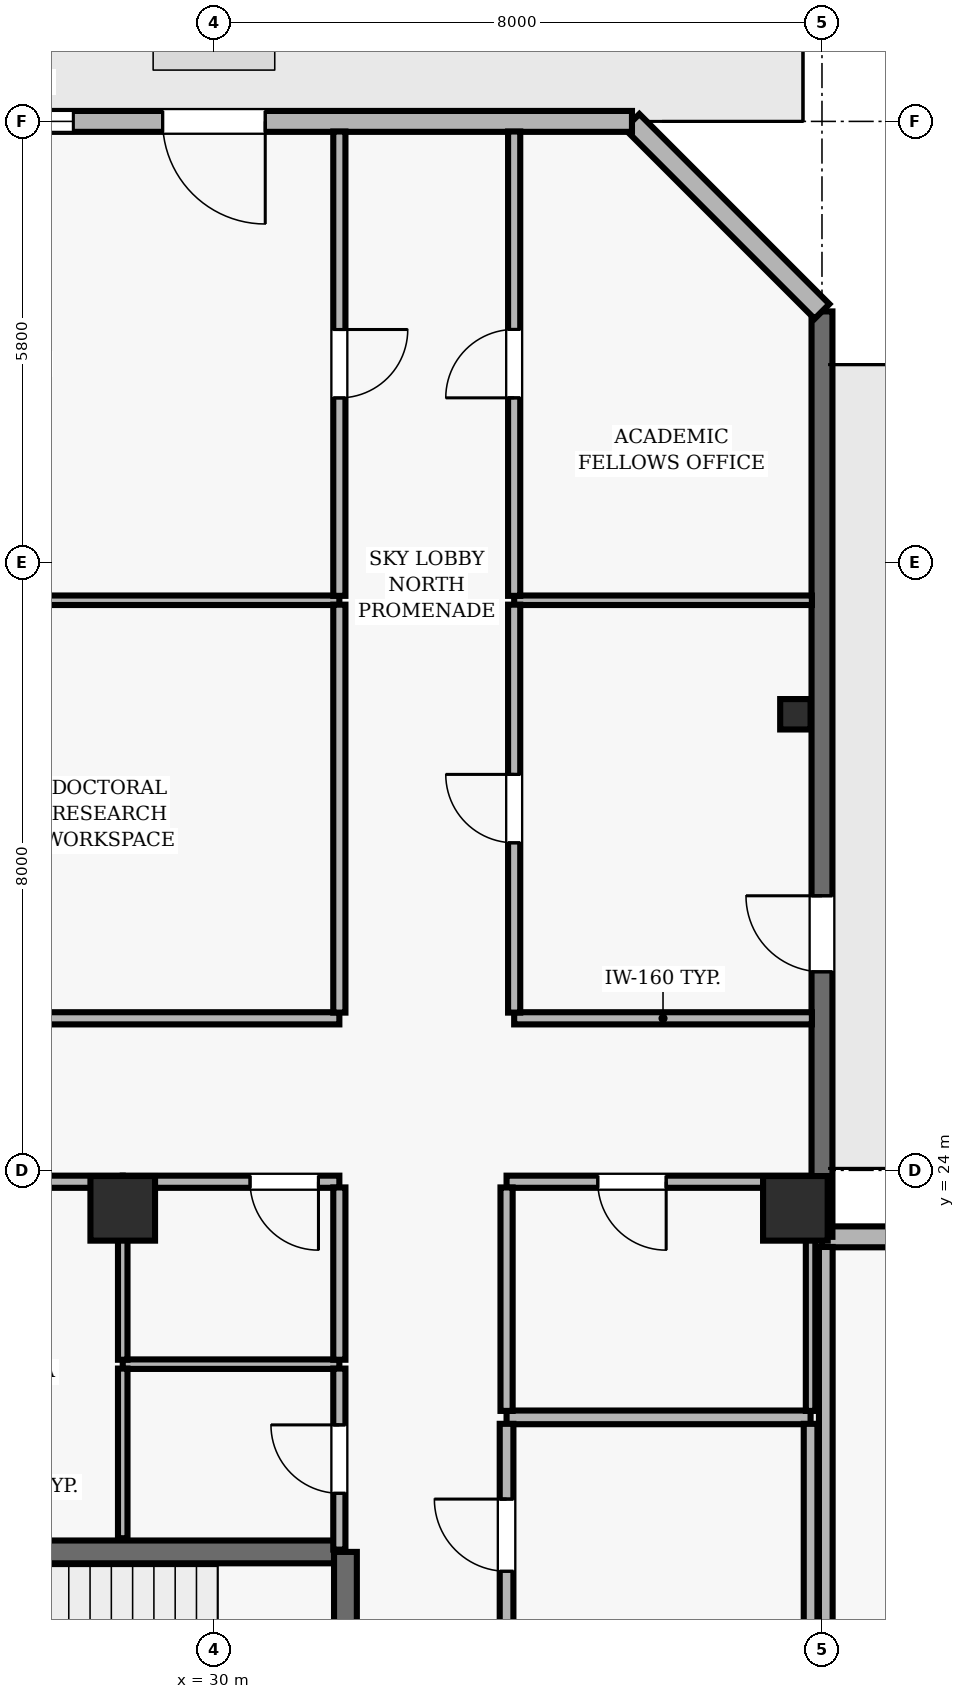
"""IFC4 building model, lengths in metres.
Left out: names, types, materials, properties, quantities, classifications, styles, units other than length and angle.
Written with IfcOpenShell. Run it as: python <this file> out.ifc"""

import sys

from ifc_helpers import new_model, si_unit, direction, frame, frame_2d, origin, origin_2d, place, context, subcontext, project, spatial, rectangle, hollow_rectangle, extrude, element, fill, save


model = new_model("IFC4")
c1 = context("Model", 3, precision=1e-05, world=origin(), true_north=direction((0.0, 1.0)))
c2 = subcontext(c1, "Body", "Model", "MODEL_VIEW")
j1 = project(units=[si_unit("LENGTHUNIT", "METRE"), si_unit("PLANEANGLEUNIT", "RADIAN")], contexts=[c1])
p1 = place(None, origin())
s1 = spatial("IfcSite", under=j1, at=p1, CompositionType="ELEMENT")
p2 = place(p1, origin())
s2 = spatial("IfcBuilding", under=s1, at=p2, CompositionType="ELEMENT")
p3 = place(p2, frame((0.0, 0.0, 243.2)))
s3 = spatial("IfcBuildingStorey", under=s2, at=p3, CompositionType="ELEMENT", Elevation=243.2)
for number, where, z_axis, x_axis in (
    (1, (28.8, 23.5, 0.0), (0.0, 0.0, 1.0), (1.0, 0.0, 0.0)),
    (2, (37.65, 23.5, 0.0), (0.0, 0.0, 1.0), (1.0, 0.0, 0.0)),
):
    element("IfcColumn", number, at=place(p3, frame(where, z_axis=z_axis, x_axis=x_axis)), inside=s3, PredefinedType="COLUMN", context=c2, shape_type="SweptSolid", body=[
        extrude(rectangle(XDim=0.85, YDim=0.85, at=origin_2d()), origin(), (0.0, 0.0, 1.0), 5.0),
    ])
p4 = place(p3, frame((37.65, 30.0, 0.0), z_axis=(0.0, 0.0, 1.0), x_axis=(1.0, 0.0, 0.0)))
e3 = element("IfcColumn", 3, at=p4, inside=s3, PredefinedType="COLUMN", context=c2, shape_type="SweptSolid", body=[
    extrude(hollow_rectangle(XDim=0.4, YDim=0.4, WallThickness=0.02, at=origin_2d()), origin(), (0.0, 0.0, 1.0), 5.0),
])
p5 = place(p3, frame((46.3, 23.125, 0.0), z_axis=(0.0, 0.0, 1.0), x_axis=(-1.0, 0.0, 0.0)))
e4 = element("IfcWall", 4, at=p5, inside=s3, PredefinedType="SOLIDWALL", context=c2, shape_type="SweptSolid", body=[
    extrude(rectangle(XDim=8.3, YDim=0.275, at=frame_2d((4.15, 0.0))), origin(), (0.0, 0.0, 1.0), 4.79),
])
p6 = place(p5, frame((3.25, 0.0, 0.9)))
e5 = element("IfcOpeningElement", 5, at=p6, cuts=e4, PredefinedType="OPENING", context=c2, shape_type="SweptSolid", body=[
    extrude(rectangle(XDim=1.8, YDim=1.8, at=frame_2d((0.9, 0.9))), frame((0.0, 0.147, 0.0), z_axis=(0.0, -1.0, 0.0), x_axis=(1.0, 0.0, 0.0)), (0.0, 0.0, 1.0), 0.295),
])
p7 = place(p3, frame((38.0, 23.125, 0.0), z_axis=(0.0, 0.0, 1.0), x_axis=(0.0, 1.0, 0.0)))
e6 = element("IfcWall", 6, at=p7, inside=s3, PredefinedType="SOLIDWALL", context=c2, shape_type="SweptSolid", body=[
    extrude(rectangle(XDim=12.175, YDim=0.275, at=frame_2d((6.087, 0.0))), origin(), (0.0, 0.0, 1.0), 4.79),
])
p8 = place(p7, frame((3.487, 0.0, 0.0)))
e7 = element("IfcOpeningElement", 7, at=p8, cuts=e6, PredefinedType="OPENING", context=c2, shape_type="SweptSolid", body=[
    extrude(rectangle(XDim=1.0, YDim=2.2, at=frame_2d((0.5, 1.1))), frame((0.0, 0.147, 0.0), z_axis=(0.0, -1.0, 0.0), x_axis=(1.0, 0.0, 0.0)), (0.0, 0.0, 1.0), 0.295),
])
p9 = place(p3, frame((38.0, 35.3, 0.0), z_axis=(0.0, 0.0, 1.0), x_axis=(-0.707106781187, 0.707106781187, 0.0)))
e8 = element("IfcWall", 8, at=p9, inside=s3, PredefinedType="SOLIDWALL", context=c2, shape_type="SweptSolid", body=[
    extrude(rectangle(XDim=3.536, YDim=0.275, at=frame_2d((1.768, 0.0))), origin(), (0.0, 0.0, 1.0), 4.79),
])
p10 = place(p3, frame((35.5, 37.8, 0.0), z_axis=(0.0, 0.0, 1.0), x_axis=(-1.0, 0.0, 0.0)))
e9 = element("IfcWall", 9, at=p10, inside=s3, PredefinedType="SOLIDWALL", context=c2, shape_type="SweptSolid", body=[
    extrude(rectangle(XDim=11.0, YDim=0.275, at=frame_2d((5.5, 0.0))), origin(), (0.0, 0.0, 1.0), 4.79),
])
p11 = place(p10, frame((4.825, 0.0, 0.0)))
e10 = element("IfcOpeningElement", 10, at=p11, cuts=e9, PredefinedType="OPENING", context=c2, shape_type="SweptSolid", body=[
    extrude(rectangle(XDim=1.35, YDim=2.2, at=frame_2d((0.675, 1.1))), frame((0.0, 0.147, 0.0), z_axis=(0.0, -1.0, 0.0), x_axis=(1.0, 0.0, 0.0)), (0.0, 0.0, 1.0), 0.295),
])
p12 = place(p10, frame((7.35, 0.0, 0.9)))
e11 = element("IfcOpeningElement", 11, at=p12, cuts=e9, PredefinedType="OPENING", context=c2, shape_type="SweptSolid", body=[
    extrude(rectangle(XDim=1.8, YDim=2.2, at=frame_2d((0.9, 1.1))), frame((0.0, 0.147, 0.0), z_axis=(0.0, -1.0, 0.0), x_axis=(1.0, 0.0, 0.0)), (0.0, 0.0, 1.0), 0.295),
])
p13 = place(p3, frame((31.58, 18.98, 0.0), z_axis=(0.0, 0.0, 1.0), x_axis=(-1.0, 0.0, 0.0)))
e12 = element("IfcWall", 12, at=p13, inside=s3, PredefinedType="SHEAR", context=c2, shape_type="SweptSolid", body=[
    extrude(rectangle(XDim=8.36, YDim=0.3, at=frame_2d((4.18, 0.0))), origin(), (0.0, 0.0, 1.0), 4.79),
])
p14 = place(p3, frame((31.73, 15.47, 0.0), z_axis=(0.0, 0.0, 1.0), x_axis=(0.0, 1.0, 0.0)))
e13 = element("IfcWall", 13, at=p14, inside=s3, PredefinedType="SHEAR", context=c2, shape_type="SweptSolid", body=[
    extrude(rectangle(XDim=3.51, YDim=0.3, at=frame_2d((1.755, 0.0))), origin(), (0.0, 0.0, 1.0), 4.79),
])
p15 = place(p14, frame((1.18, 0.0, 0.0)))
e14 = element("IfcOpeningElement", 14, at=p15, cuts=e13, PredefinedType="OPENING", context=c2, shape_type="SweptSolid", body=[
    extrude(rectangle(XDim=1.15, YDim=2.15, at=frame_2d((0.575, 1.075))), frame((0.0, 0.16, 0.0), z_axis=(0.0, -1.0, 0.0), x_axis=(1.0, 0.0, 0.0)), (0.0, 0.0, 1.0), 0.32),
])
p16 = place(p3, frame((28.8, 23.85, 0.0), z_axis=(0.0, 0.0, 1.0), x_axis=(-1.0, 0.0, 0.0)))
e15 = element("IfcWall", 15, at=p16, inside=s3, PredefinedType="PARTITIONING", context=c2, shape_type="SweptSolid", body=[
    extrude(rectangle(XDim=3.25, YDim=0.16, at=frame_2d((1.625, 0.0))), origin(), (0.0, 0.0, 1.0), 4.327),
])
p17 = place(p16, frame((1.875, 0.0, 0.0)))
e16 = element("IfcOpeningElement", 16, at=p17, cuts=e15, PredefinedType="OPENING", context=c2, shape_type="SweptSolid", body=[
    extrude(rectangle(XDim=0.9, YDim=2.1, at=frame_2d((0.45, 1.05))), frame((0.0, 0.09, 0.0), z_axis=(0.0, -1.0, 0.0), x_axis=(1.0, 0.0, 0.0)), (0.0, 0.0, 1.0), 0.18),
])
p18 = place(p3, frame((31.65, 21.45, 0.0), z_axis=(0.0, 0.0, 1.0), x_axis=(-1.0, 0.0, 0.0)))
e17 = element("IfcWall", 17, at=p18, inside=s3, PredefinedType="PARTITIONING", context=c2, shape_type="SweptSolid", body=[
    extrude(rectangle(XDim=2.85, YDim=0.125, at=frame_2d((1.425, 0.0))), origin(), (0.0, 0.0, 1.0), 4.79),
])
p19 = place(p3, frame((31.65, 23.85, 0.0), z_axis=(0.0, 0.0, 1.0), x_axis=(-1.0, 0.0, 0.0)))
e18 = element("IfcWall", 18, at=p19, inside=s3, PredefinedType="PARTITIONING", context=c2, shape_type="SweptSolid", body=[
    extrude(rectangle(XDim=2.85, YDim=0.16, at=frame_2d((1.425, 0.0))), origin(), (0.0, 0.0, 1.0), 4.327),
])
p20 = place(p19, frame((0.275, 0.0, 0.0)))
e19 = element("IfcOpeningElement", 19, at=p20, cuts=e18, PredefinedType="OPENING", context=c2, shape_type="SweptSolid", body=[
    extrude(rectangle(XDim=0.9, YDim=2.1, at=frame_2d((0.45, 1.05))), frame((0.0, 0.09, 0.0), z_axis=(0.0, -1.0, 0.0), x_axis=(1.0, 0.0, 0.0)), (0.0, 0.0, 1.0), 0.18),
])
p21 = place(p3, frame((31.65, 26.0, 0.0), z_axis=(0.0, 0.0, 1.0), x_axis=(-1.0, 0.0, 0.0)))
e20 = element("IfcWall", 20, at=p21, inside=s3, PredefinedType="PARTITIONING", context=c2, shape_type="SweptSolid", body=[
    extrude(rectangle(XDim=9.517, YDim=0.16, at=frame_2d((4.758, 0.0))), origin(), (0.0, 0.0, 1.0), 4.79),
])
p22 = place(p21, frame((4.308, 0.0, 0.0)))
e21 = element("IfcOpeningElement", 21, at=p22, cuts=e20, PredefinedType="OPENING", context=c2, shape_type="SweptSolid", body=[
    extrude(rectangle(XDim=0.9, YDim=2.1, at=frame_2d((0.45, 1.05))), frame((0.0, 0.09, 0.0), z_axis=(0.0, -1.0, 0.0), x_axis=(1.0, 0.0, 0.0)), (0.0, 0.0, 1.0), 0.18),
])
p23 = place(p3, frame((31.65, 31.5, 0.0), z_axis=(0.0, 0.0, 1.0), x_axis=(-1.0, 0.0, 0.0)))
e22 = element("IfcWall", 22, at=p23, inside=s3, PredefinedType="PARTITIONING", context=c2, shape_type="SweptSolid", body=[
    extrude(rectangle(XDim=9.517, YDim=0.125, at=frame_2d((4.758, 0.0))), origin(), (0.0, 0.0, 1.0), 4.79),
])
p24 = place(p3, frame((37.85, 20.75, 0.0), z_axis=(0.0, 0.0, 1.0), x_axis=(-1.0, 0.0, 0.0)))
e23 = element("IfcWall", 23, at=p24, inside=s3, PredefinedType="PARTITIONING", context=c2, shape_type="SweptSolid", body=[
    extrude(rectangle(XDim=4.0, YDim=0.18, at=frame_2d((2.0, 0.0))), origin(), (0.0, 0.0, 1.0), 4.79),
])
p25 = place(p3, frame((37.85, 23.85, 0.0), z_axis=(0.0, 0.0, 1.0), x_axis=(-1.0, 0.0, 0.0)))
e24 = element("IfcWall", 24, at=p25, inside=s3, PredefinedType="PARTITIONING", context=c2, shape_type="SweptSolid", body=[
    extrude(rectangle(XDim=4.0, YDim=0.16, at=frame_2d((2.0, 0.0))), origin(), (0.0, 0.0, 1.0), 4.327),
])
p26 = place(p25, frame((1.9, 0.0, 0.0)))
e25 = element("IfcOpeningElement", 25, at=p26, cuts=e24, PredefinedType="OPENING", context=c2, shape_type="SweptSolid", body=[
    extrude(rectangle(XDim=0.9, YDim=2.1, at=frame_2d((0.45, 1.05))), frame((0.0, 0.09, 0.0), z_axis=(0.0, -1.0, 0.0), x_axis=(1.0, 0.0, 0.0)), (0.0, 0.0, 1.0), 0.18),
])
p27 = place(p3, frame((37.867, 26.0, 0.0), z_axis=(0.0, 0.0, 1.0), x_axis=(-1.0, 0.0, 0.0)))
e26 = element("IfcWall", 26, at=p27, inside=s3, PredefinedType="PARTITIONING", context=c2, shape_type="SweptSolid", body=[
    extrude(rectangle(XDim=3.917, YDim=0.16, at=frame_2d((1.958, 0.0))), origin(), (0.0, 0.0, 1.0), 4.79),
])
p28 = place(p3, frame((37.867, 31.5, 0.0), z_axis=(0.0, 0.0, 1.0), x_axis=(-1.0, 0.0, 0.0)))
e27 = element("IfcWall", 27, at=p28, inside=s3, PredefinedType="PARTITIONING", context=c2, shape_type="SweptSolid", body=[
    extrude(rectangle(XDim=3.917, YDim=0.125, at=frame_2d((1.958, 0.0))), origin(), (0.0, 0.0, 1.0), 4.79),
])
p29 = place(p3, frame((28.8, 21.392, 0.0), z_axis=(0.0, 0.0, 1.0), x_axis=(0.0, -1.0, 0.0)))
e28 = element("IfcWall", 28, at=p29, inside=s3, PredefinedType="PARTITIONING", context=c2, shape_type="SweptSolid", body=[
    extrude(rectangle(XDim=2.232, YDim=0.125, at=frame_2d((1.116, 0.0))), origin(), (0.0, 0.0, 1.0), 4.79),
])
p30 = place(p3, frame((28.8, 23.775, 0.0), z_axis=(0.0, 0.0, 1.0), x_axis=(0.0, -1.0, 0.0)))
e29 = element("IfcWall", 29, at=p30, inside=s3, PredefinedType="PARTITIONING", context=c2, shape_type="SweptSolid", body=[
    extrude(rectangle(XDim=2.267, YDim=0.125, at=frame_2d((1.133, 0.0))), origin(), (0.0, 0.0, 1.0), 4.79),
])
p31 = place(p3, frame((31.65, 19.01, 0.0), z_axis=(0.0, 0.0, 1.0), x_axis=(0.0, 1.0, 0.0)))
e30 = element("IfcWall", 30, at=p31, inside=s3, PredefinedType="PARTITIONING", context=c2, shape_type="SweptSolid", body=[
    extrude(rectangle(XDim=2.382, YDim=0.16, at=frame_2d((1.191, 0.0))), origin(), (0.0, 0.0, 1.0), 4.79),
])
p32 = place(p31, frame((0.741, 0.0, 0.0)))
e31 = element("IfcOpeningElement", 31, at=p32, cuts=e30, PredefinedType="OPENING", context=c2, shape_type="SweptSolid", body=[
    extrude(rectangle(XDim=0.9, YDim=2.1, at=frame_2d((0.45, 1.05))), frame((0.0, 0.09, 0.0), z_axis=(0.0, -1.0, 0.0), x_axis=(1.0, 0.0, 0.0)), (0.0, 0.0, 1.0), 0.18),
])
p33 = place(p3, frame((31.65, 23.775, 0.0), z_axis=(0.0, 0.0, 1.0), x_axis=(0.0, -1.0, 0.0)))
e32 = element("IfcWall", 32, at=p33, inside=s3, PredefinedType="PARTITIONING", context=c2, shape_type="SweptSolid", body=[
    extrude(rectangle(XDim=2.267, YDim=0.16, at=frame_2d((1.133, 0.0))), origin(), (0.0, 0.0, 1.0), 4.79),
])
p34 = place(p3, frame((31.65, 31.442, 0.0), z_axis=(0.0, 0.0, 1.0), x_axis=(0.0, -1.0, 0.0)))
e33 = element("IfcWall", 33, at=p34, inside=s3, PredefinedType="PARTITIONING", context=c2, shape_type="SweptSolid", body=[
    extrude(rectangle(XDim=5.367, YDim=0.16, at=frame_2d((2.684, 0.0))), origin(), (0.0, 0.0, 1.0), 4.79),
])
p35 = place(p3, frame((31.65, 37.667, 0.0), z_axis=(0.0, 0.0, 1.0), x_axis=(0.0, -1.0, 0.0)))
e34 = element("IfcWall", 34, at=p35, inside=s3, PredefinedType="PARTITIONING", context=c2, shape_type="SweptSolid", body=[
    extrude(rectangle(XDim=6.109, YDim=0.16, at=frame_2d((3.054, 0.0))), origin(), (0.0, 0.0, 1.0), 4.79),
])
p36 = place(p35, frame((2.605, 0.0, 0.0)))
e35 = element("IfcOpeningElement", 35, at=p36, cuts=e34, PredefinedType="OPENING", context=c2, shape_type="SweptSolid", body=[
    extrude(rectangle(XDim=0.9, YDim=2.1, at=frame_2d((0.45, 1.05))), frame((0.0, 0.09, 0.0), z_axis=(0.0, -1.0, 0.0), x_axis=(1.0, 0.0, 0.0)), (0.0, 0.0, 1.0), 0.18),
])
p37 = place(p3, frame((33.85, 17.735, 0.0), z_axis=(0.0, 0.0, 1.0), x_axis=(0.0, 1.0, 0.0)))
e36 = element("IfcWall", 36, at=p37, inside=s3, PredefinedType="PARTITIONING", context=c2, shape_type="SweptSolid", body=[
    extrude(rectangle(XDim=2.93, YDim=0.18, at=frame_2d((1.465, 0.0))), origin(), (0.0, 0.0, 1.0), 4.79),
])
p38 = place(p37, frame((0.99, 0.0, 0.0)))
e37 = element("IfcOpeningElement", 37, at=p38, cuts=e36, PredefinedType="OPENING", context=c2, shape_type="SweptSolid", body=[
    extrude(rectangle(XDim=0.95, YDim=2.1, at=frame_2d((0.475, 1.05))), frame((0.0, 0.1, 0.0), z_axis=(0.0, -1.0, 0.0), x_axis=(1.0, 0.0, 0.0)), (0.0, 0.0, 1.0), 0.2),
])
p39 = place(p3, frame((33.85, 20.835, 0.0), z_axis=(0.0, 0.0, 1.0), x_axis=(0.0, 1.0, 0.0)))
e38 = element("IfcWall", 38, at=p39, inside=s3, PredefinedType="PARTITIONING", context=c2, shape_type="SweptSolid", body=[
    extrude(rectangle(XDim=2.94, YDim=0.16, at=frame_2d((1.47, 0.0))), origin(), (0.0, 0.0, 1.0), 4.79),
])
p40 = place(p3, frame((33.95, 26.075, 0.0), z_axis=(0.0, 0.0, 1.0), x_axis=(0.0, 1.0, 0.0)))
e39 = element("IfcWall", 39, at=p40, inside=s3, PredefinedType="PARTITIONING", context=c2, shape_type="SweptSolid", body=[
    extrude(rectangle(XDim=5.367, YDim=0.16, at=frame_2d((2.684, 0.0))), origin(), (0.0, 0.0, 1.0), 4.79),
])
p41 = place(p40, frame((2.234, 0.0, 0.0)))
e40 = element("IfcOpeningElement", 40, at=p41, cuts=e39, PredefinedType="OPENING", context=c2, shape_type="SweptSolid", body=[
    extrude(rectangle(XDim=0.9, YDim=2.1, at=frame_2d((0.45, 1.05))), frame((0.0, 0.09, 0.0), z_axis=(0.0, -1.0, 0.0), x_axis=(1.0, 0.0, 0.0)), (0.0, 0.0, 1.0), 0.18),
])
p42 = place(p3, frame((33.95, 31.558, 0.0), z_axis=(0.0, 0.0, 1.0), x_axis=(0.0, 1.0, 0.0)))
e41 = element("IfcWall", 41, at=p42, inside=s3, PredefinedType="PARTITIONING", context=c2, shape_type="SweptSolid", body=[
    extrude(rectangle(XDim=6.109, YDim=0.16, at=frame_2d((3.054, 0.0))), origin(), (0.0, 0.0, 1.0), 4.79),
])
p43 = place(p42, frame((2.605, 0.0, 0.0)))
e42 = element("IfcOpeningElement", 42, at=p43, cuts=e41, PredefinedType="OPENING", context=c2, shape_type="SweptSolid", body=[
    extrude(rectangle(XDim=0.9, YDim=2.1, at=frame_2d((0.45, 1.05))), frame((0.0, 0.09, 0.0), z_axis=(0.0, -1.0, 0.0), x_axis=(1.0, 0.0, 0.0)), (0.0, 0.0, 1.0), 0.18),
])
p44 = place(p3, frame((37.85, 17.65, 0.0), z_axis=(0.0, 0.0, 1.0), x_axis=(0.0, 1.0, 0.0)))
e43 = element("IfcWall", 43, at=p44, inside=s3, PredefinedType="PARTITIONING", context=c2, shape_type="SweptSolid", body=[
    extrude(rectangle(XDim=3.015, YDim=0.18, at=frame_2d((1.508, 0.0))), origin(), (0.0, 0.0, 1.0), 4.327),
])
p45 = place(p3, frame((37.85, 20.835, 0.0), z_axis=(0.0, 0.0, 1.0), x_axis=(0.0, 1.0, 0.0)))
e44 = element("IfcWall", 44, at=p45, inside=s3, PredefinedType="PARTITIONING", context=c2, shape_type="SweptSolid", body=[
    extrude(rectangle(XDim=2.29, YDim=0.125, at=frame_2d((1.145, 0.0))), origin(), (0.0, 0.0, 1.0), 4.327),
])
p46 = place(p3, frame((38.05, 22.992, 0.0), z_axis=(0.0, 0.0, 1.0), x_axis=(0.0, -1.0, 0.0)))
e45 = element("IfcWall", 45, at=p46, inside=s3, PredefinedType="PARTITIONING", context=c2, shape_type="SweptSolid", body=[
    extrude(rectangle(XDim=6.917, YDim=0.18, at=frame_2d((3.458, 0.0))), origin(), (0.0, 0.0, 1.0), 4.327),
])
p47 = place(p8, origin())
e46 = element("IfcDoor", 46, at=p47, inside=s3, OperationType="SINGLE_SWING_RIGHT", PredefinedType="DOOR", context=c2, shape_type="SweptSolid", body=[
    extrude(rectangle(XDim=1.0, YDim=2.2, at=frame_2d((0.5, 1.1))), frame((0.0, 0.025, 0.0), z_axis=(0.0, -1.0, 0.0), x_axis=(1.0, 0.0, 0.0)), (0.0, 0.0, 1.0), 0.05),
])
fill(e7, e46)
p48 = place(p11, origin())
e47 = element("IfcDoor", 47, at=p48, inside=s3, OperationType="SINGLE_SWING_LEFT", PredefinedType="DOOR", context=c2, shape_type="SweptSolid", body=[
    extrude(rectangle(XDim=1.35, YDim=2.2, at=frame_2d((0.675, 1.1))), frame((0.0, 0.025, 0.0), z_axis=(0.0, -1.0, 0.0), x_axis=(1.0, 0.0, 0.0)), (0.0, 0.0, 1.0), 0.05),
])
fill(e10, e47)
p49 = place(p12, origin())
e48 = element("IfcWindow", 48, at=p49, inside=s3, PartitioningType="SINGLE_PANEL", PredefinedType="WINDOW", context=c2, shape_type="SweptSolid", body=[
    extrude(rectangle(XDim=1.8, YDim=2.2, at=frame_2d((0.9, 1.1))), frame((0.0, 0.03, 0.0), z_axis=(0.0, -1.0, 0.0), x_axis=(1.0, 0.0, 0.0)), (0.0, 0.0, 1.0), 0.06),
])
fill(e11, e48)
p50 = place(p38, origin())
e49 = element("IfcDoor", 49, at=p50, inside=s3, OperationType="SINGLE_SWING_RIGHT", PredefinedType="DOOR", context=c2, shape_type="SweptSolid", body=[
    extrude(rectangle(XDim=0.95, YDim=2.1, at=frame_2d((0.475, 1.05))), frame((0.0, 0.025, 0.0), z_axis=(0.0, -1.0, 0.0), x_axis=(1.0, 0.0, 0.0)), (0.0, 0.0, 1.0), 0.05),
])
fill(e37, e49)
p51 = place(p26, origin())
e50 = element("IfcDoor", 50, at=p51, inside=s3, OperationType="SINGLE_SWING_LEFT", PredefinedType="DOOR", context=c2, shape_type="SweptSolid", body=[
    extrude(rectangle(XDim=0.9, YDim=2.1, at=frame_2d((0.45, 1.05))), frame((0.0, 0.025, 0.0), z_axis=(0.0, -1.0, 0.0), x_axis=(1.0, 0.0, 0.0)), (0.0, 0.0, 1.0), 0.05),
])
fill(e25, e50)
p52 = place(p32, origin())
e51 = element("IfcDoor", 51, at=p52, inside=s3, OperationType="SINGLE_SWING_RIGHT", PredefinedType="DOOR", context=c2, shape_type="SweptSolid", body=[
    extrude(rectangle(XDim=0.9, YDim=2.1, at=frame_2d((0.45, 1.05))), frame((0.0, 0.025, 0.0), z_axis=(0.0, -1.0, 0.0), x_axis=(1.0, 0.0, 0.0)), (0.0, 0.0, 1.0), 0.05),
])
fill(e31, e51)
p53 = place(p20, origin())
e52 = element("IfcDoor", 52, at=p53, inside=s3, OperationType="SINGLE_SWING_LEFT", PredefinedType="DOOR", context=c2, shape_type="SweptSolid", body=[
    extrude(rectangle(XDim=0.9, YDim=2.1, at=frame_2d((0.45, 1.05))), frame((0.0, 0.025, 0.0), z_axis=(0.0, -1.0, 0.0), x_axis=(1.0, 0.0, 0.0)), (0.0, 0.0, 1.0), 0.05),
])
fill(e19, e52)
p54 = place(p41, origin())
e53 = element("IfcDoor", 53, at=p54, inside=s3, OperationType="SINGLE_SWING_RIGHT", PredefinedType="DOOR", context=c2, shape_type="SweptSolid", body=[
    extrude(rectangle(XDim=0.9, YDim=2.1, at=frame_2d((0.45, 1.05))), frame((0.0, 0.025, 0.0), z_axis=(0.0, -1.0, 0.0), x_axis=(1.0, 0.0, 0.0)), (0.0, 0.0, 1.0), 0.05),
])
fill(e40, e53)
p55 = place(p43, origin())
e54 = element("IfcDoor", 54, at=p55, inside=s3, OperationType="SINGLE_SWING_LEFT", PredefinedType="DOOR", context=c2, shape_type="SweptSolid", body=[
    extrude(rectangle(XDim=0.9, YDim=2.1, at=frame_2d((0.45, 1.05))), frame((0.0, 0.025, 0.0), z_axis=(0.0, -1.0, 0.0), x_axis=(1.0, 0.0, 0.0)), (0.0, 0.0, 1.0), 0.05),
])
fill(e42, e54)
p56 = place(p36, origin())
e55 = element("IfcDoor", 55, at=p56, inside=s3, OperationType="SINGLE_SWING_LEFT", PredefinedType="DOOR", context=c2, shape_type="SweptSolid", body=[
    extrude(rectangle(XDim=0.9, YDim=2.1, at=frame_2d((0.45, 1.05))), frame((0.0, 0.025, 0.0), z_axis=(0.0, -1.0, 0.0), x_axis=(1.0, 0.0, 0.0)), (0.0, 0.0, 1.0), 0.05),
])
fill(e35, e55)
save(model, sys.argv[1])
